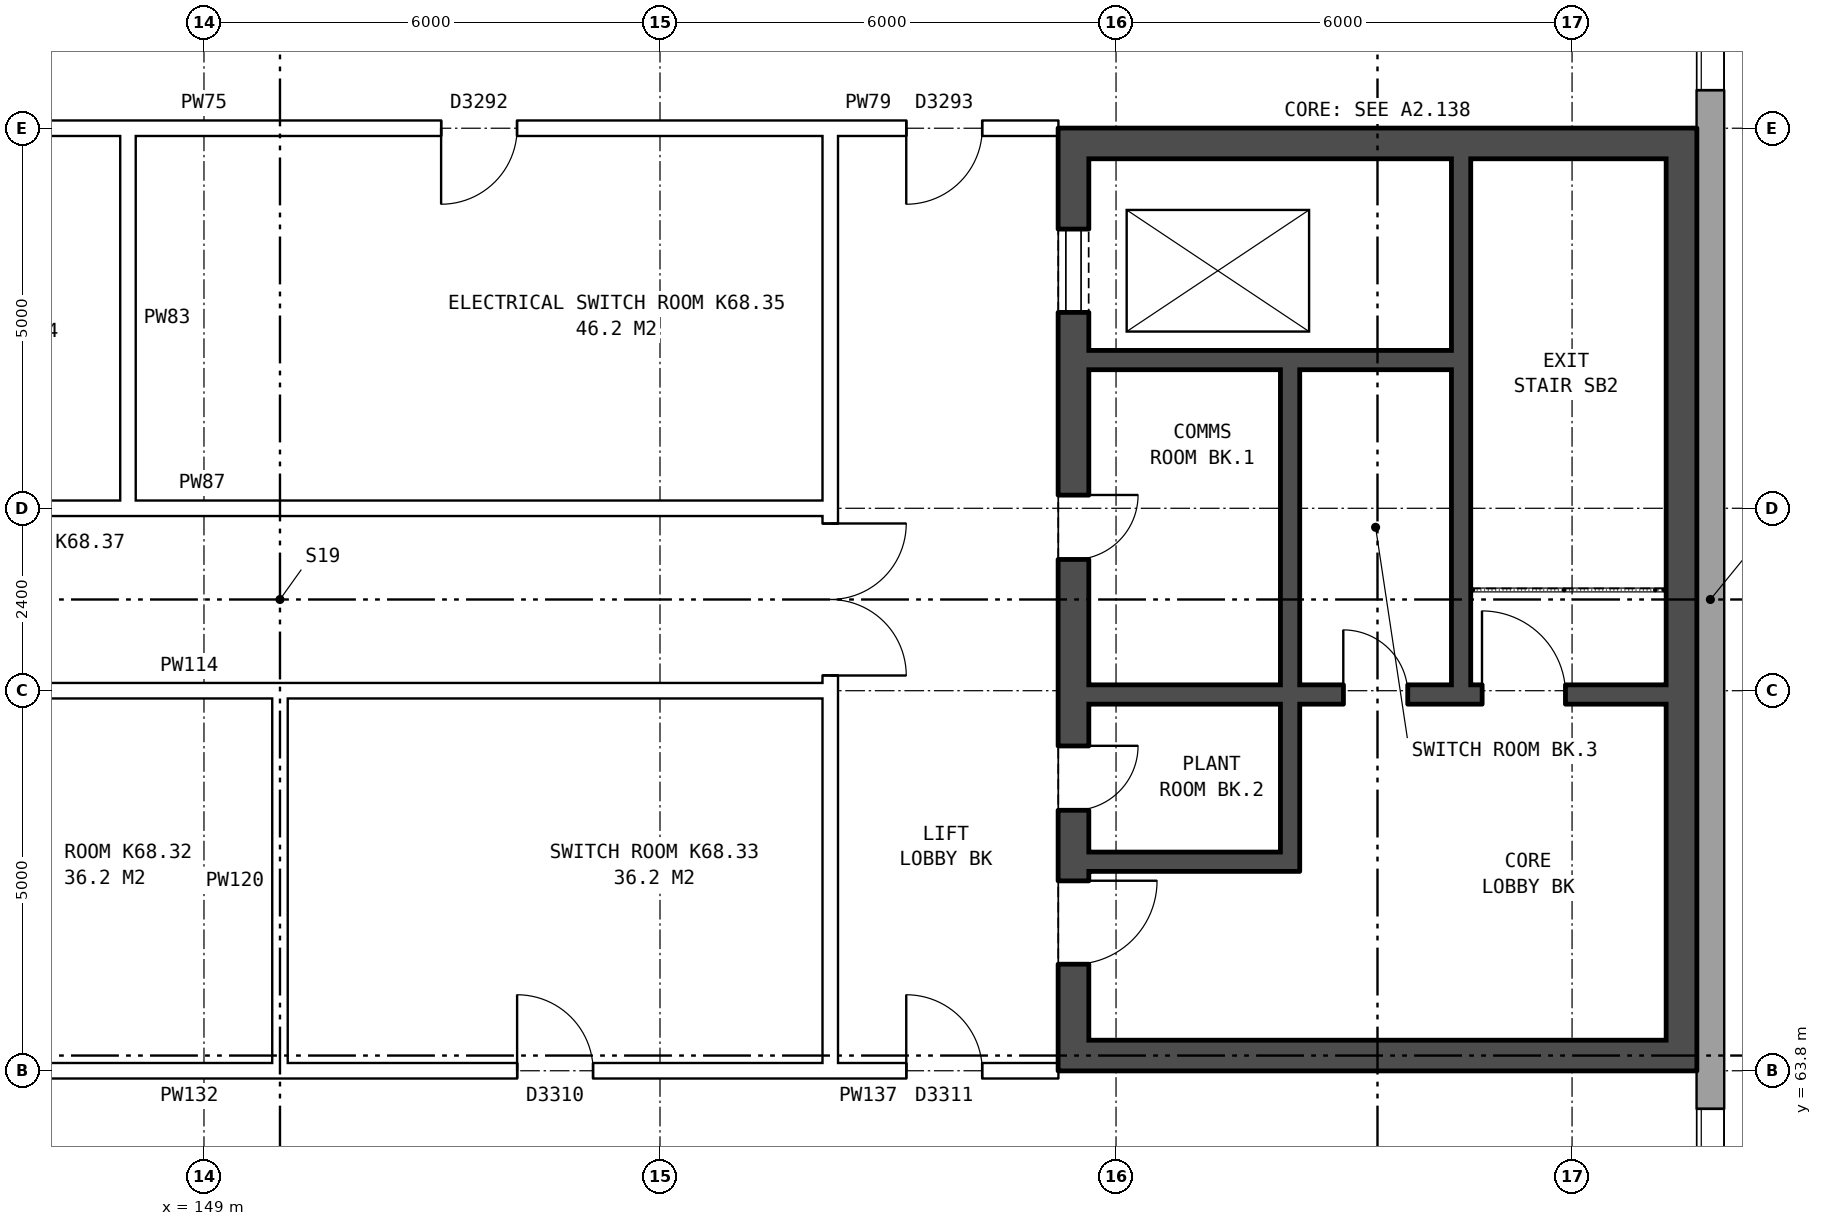
"""IFC4 building model, lengths in metres.
Left out: names, types, materials, properties, quantities, classifications, styles, units other than length and angle.
Written with IfcOpenShell. Run it as: python <this file> out.ifc"""

import sys

from ifc_helpers import new_model, si_unit, direction, frame, frame_2d, origin, place, context, subcontext, project, spatial, polyline, rectangle, outline, extrude, element, fill, save


model = new_model("IFC4")
c1 = context("Model", 3, precision=1e-05, world=origin(), true_north=direction((0.0, 1.0)))
c2 = subcontext(c1, "Body", "Model", "MODEL_VIEW")
j1 = project(units=[si_unit("LENGTHUNIT", "METRE"), si_unit("PLANEANGLEUNIT", "RADIAN")], contexts=[c1])
p1 = place(None, origin())
s1 = spatial("IfcSite", under=j1, at=p1, CompositionType="ELEMENT")
p2 = place(p1, origin())
s2 = spatial("IfcBuilding", under=s1, at=p2, CompositionType="ELEMENT")
p3 = place(p2, frame((0.0, 0.0, 243.9)))
s3 = spatial("IfcBuildingStorey", under=s2, at=p3, CompositionType="ELEMENT", Elevation=243.9)
p4 = place(p3, frame((168.82, 57.075, 0.0), z_axis=(0.0, 0.0, 1.0), x_axis=(0.0, 1.0, 0.0)))
e1 = element("IfcWall", 1, at=p4, inside=s3, PredefinedType="STANDARD", context=c2, shape_type="SweptSolid", body=[
    extrude(outline(polyline([(0.0, 0.0), (25.851, 0.0), (25.851, 17.763), (0.0, 4.837), (0.0, 0.0)])), frame((0.0, 0.18, 0.0), z_axis=(0.0, -1.0, 0.0), x_axis=(1.0, 0.0, 0.0)), (0.0, 0.0, 1.0), 0.36),
])
p5 = place(p4, frame((1.625, 0.0, 1.5)))
e2 = element("IfcOpeningElement", 2, at=p5, cuts=e1, PredefinedType="OPENING", context=c2, shape_type="SweptSolid", body=[
    extrude(rectangle(XDim=1.6, YDim=1.2, at=frame_2d((0.8, 0.6))), frame((0.0, 0.19, 0.0), z_axis=(0.0, -1.0, 0.0), x_axis=(1.0, 0.0, 0.0)), (0.0, 0.0, 1.0), 0.38),
])
p6 = place(p4, frame((4.625, 0.0, 1.5)))
e3 = element("IfcOpeningElement", 3, at=p6, cuts=e1, PredefinedType="OPENING", context=c2, shape_type="SweptSolid", body=[
    extrude(rectangle(XDim=1.6, YDim=1.2, at=frame_2d((0.8, 0.6))), frame((0.0, 0.19, 0.0), z_axis=(0.0, -1.0, 0.0), x_axis=(1.0, 0.0, 0.0)), (0.0, 0.0, 1.0), 0.38),
])
p7 = place(p4, frame((19.625, 0.0, 1.5)))
e4 = element("IfcOpeningElement", 4, at=p7, cuts=e1, PredefinedType="OPENING", context=c2, shape_type="SweptSolid", body=[
    extrude(rectangle(XDim=1.6, YDim=1.2, at=frame_2d((0.8, 0.6))), frame((0.0, 0.19, 0.0), z_axis=(0.0, -1.0, 0.0), x_axis=(1.0, 0.0, 0.0)), (0.0, 0.0, 1.0), 0.38),
])
p8 = place(p4, frame((22.625, 0.0, 1.5)))
e5 = element("IfcOpeningElement", 5, at=p8, cuts=e1, PredefinedType="OPENING", context=c2, shape_type="SweptSolid", body=[
    extrude(rectangle(XDim=1.6, YDim=1.2, at=frame_2d((0.8, 0.6))), frame((0.0, 0.19, 0.0), z_axis=(0.0, -1.0, 0.0), x_axis=(1.0, 0.0, 0.0)), (0.0, 0.0, 1.0), 0.38),
])
p9 = place(p3, frame((160.44, 76.2, 0.0), z_axis=(0.0, 0.0, 1.0), x_axis=(0.0, -1.0, 0.0)))
e6 = element("IfcWall", 6, at=p9, inside=s3, PredefinedType="SHEAR", context=c2, shape_type="SweptSolid", body=[
    extrude(rectangle(XDim=12.4, YDim=0.4, at=frame_2d((6.2, 0.0))), origin(), (0.0, 0.0, 1.0), 3.3),
])
p10 = place(p9, frame((1.325, 0.0, 0.0)))
e7 = element("IfcOpeningElement", 7, at=p10, cuts=e6, PredefinedType="OPENING", context=c2, shape_type="SweptSolid", body=[
    extrude(rectangle(XDim=1.1, YDim=2.1, at=frame_2d((0.55, 1.05))), frame((0.0, 0.21, 0.0), z_axis=(0.0, -1.0, 0.0), x_axis=(1.0, 0.0, 0.0)), (0.0, 0.0, 1.0), 0.42),
])
p11 = place(p9, frame((4.825, 0.0, 0.0)))
e8 = element("IfcOpeningElement", 8, at=p11, cuts=e6, PredefinedType="OPENING", context=c2, shape_type="SweptSolid", body=[
    extrude(rectangle(XDim=0.85, YDim=2.1, at=frame_2d((0.425, 1.05))), frame((0.0, 0.21, 0.0), z_axis=(0.0, -1.0, 0.0), x_axis=(1.0, 0.0, 0.0)), (0.0, 0.0, 1.0), 0.42),
])
p12 = place(p9, frame((9.9, 0.0, 0.0)))
e9 = element("IfcOpeningElement", 9, at=p12, cuts=e6, PredefinedType="OPENING", context=c2, shape_type="SweptSolid", body=[
    extrude(rectangle(XDim=1.1, YDim=2.1, at=frame_2d((0.55, 1.05))), frame((0.0, 0.21, 0.0), z_axis=(0.0, -1.0, 0.0), x_axis=(1.0, 0.0, 0.0)), (0.0, 0.0, 1.0), 0.42),
])
p13 = place(p9, frame((8.125, 0.0, 0.0)))
e10 = element("IfcOpeningElement", 10, at=p13, cuts=e6, PredefinedType="OPENING", context=c2, shape_type="SweptSolid", body=[
    extrude(rectangle(XDim=0.85, YDim=2.1, at=frame_2d((0.425, 1.05))), frame((0.0, 0.21, 0.0), z_axis=(0.0, -1.0, 0.0), x_axis=(1.0, 0.0, 0.0)), (0.0, 0.0, 1.0), 0.42),
])
p14 = place(p3, frame((168.44, 76.2, 0.0), z_axis=(0.0, 0.0, 1.0), x_axis=(0.0, -1.0, 0.0)))
e11 = element("IfcWall", 11, at=p14, inside=s3, PredefinedType="SHEAR", context=c2, shape_type="SweptSolid", body=[
    extrude(rectangle(XDim=12.4, YDim=0.4, at=frame_2d((6.2, 0.0))), origin(), (0.0, 0.0, 1.0), 3.3),
])
for number, where, z_axis, x_axis in (
    (12, (160.64, 76.0, 0.0), (0.0, 0.0, 1.0), (1.0, 0.0, 0.0)),
    (13, (160.64, 64.0, 0.0), (0.0, 0.0, 1.0), (1.0, 0.0, 0.0)),
):
    element("IfcWall", number, at=place(p3, frame(where, z_axis=z_axis, x_axis=x_axis)), inside=s3, PredefinedType="SHEAR", context=c2, shape_type="SweptSolid", body=[
        extrude(rectangle(XDim=7.6, YDim=0.4, at=frame_2d((3.8, 0.0))), origin(), (0.0, 0.0, 1.0), 3.3),
    ])
p15 = place(p3, frame((160.64, 73.15, 0.0), z_axis=(0.0, 0.0, 1.0), x_axis=(1.0, 0.0, 0.0)))
e14 = element("IfcWall", 14, at=p15, inside=s3, PredefinedType="SHEAR", context=c2, shape_type="SweptSolid", body=[
    extrude(rectangle(XDim=4.775, YDim=0.25, at=frame_2d((2.388, 0.0))), origin(), (0.0, 0.0, 1.0), 3.3),
])
p16 = place(p3, frame((160.64, 68.75, 0.0), z_axis=(0.0, 0.0, 1.0), x_axis=(1.0, 0.0, 0.0)))
e15 = element("IfcWall", 15, at=p16, inside=s3, PredefinedType="SHEAR", context=c2, shape_type="SweptSolid", body=[
    extrude(rectangle(XDim=7.6, YDim=0.25, at=frame_2d((3.8, 0.0))), origin(), (0.0, 0.0, 1.0), 3.3),
])
p17 = place(p16, frame((5.175, 0.0, 0.0)))
e16 = element("IfcOpeningElement", 16, at=p17, cuts=e15, PredefinedType="OPENING", context=c2, shape_type="SweptSolid", body=[
    extrude(rectangle(XDim=1.1, YDim=2.1, at=frame_2d((0.55, 1.05))), frame((0.0, 0.135, 0.0), z_axis=(0.0, -1.0, 0.0), x_axis=(1.0, 0.0, 0.0)), (0.0, 0.0, 1.0), 0.27),
])
p18 = place(p16, frame((3.35, 0.0, 0.0)))
e17 = element("IfcOpeningElement", 17, at=p18, cuts=e15, PredefinedType="OPENING", context=c2, shape_type="SweptSolid", body=[
    extrude(rectangle(XDim=0.85, YDim=2.1, at=frame_2d((0.425, 1.05))), frame((0.0, 0.135, 0.0), z_axis=(0.0, -1.0, 0.0), x_axis=(1.0, 0.0, 0.0)), (0.0, 0.0, 1.0), 0.27),
])
p19 = place(p3, frame((160.64, 66.55, 0.0), z_axis=(0.0, 0.0, 1.0), x_axis=(1.0, 0.0, 0.0)))
e18 = element("IfcWall", 18, at=p19, inside=s3, PredefinedType="SHEAR", context=c2, shape_type="SweptSolid", body=[
    extrude(rectangle(XDim=2.525, YDim=0.25, at=frame_2d((1.263, 0.0))), origin(), (0.0, 0.0, 1.0), 3.3),
])
p20 = place(p3, frame((163.29, 73.025, 0.0), z_axis=(0.0, 0.0, 1.0), x_axis=(0.0, -1.0, 0.0)))
e19 = element("IfcWall", 19, at=p20, inside=s3, PredefinedType="SHEAR", context=c2, shape_type="SweptSolid", body=[
    extrude(rectangle(XDim=4.15, YDim=0.25, at=frame_2d((2.075, 0.0))), origin(), (0.0, 0.0, 1.0), 3.3),
])
p21 = place(p3, frame((163.29, 68.625, 0.0), z_axis=(0.0, 0.0, 1.0), x_axis=(0.0, -1.0, 0.0)))
e20 = element("IfcWall", 20, at=p21, inside=s3, PredefinedType="SHEAR", context=c2, shape_type="SweptSolid", body=[
    extrude(rectangle(XDim=2.2, YDim=0.25, at=frame_2d((1.1, 0.0))), origin(), (0.0, 0.0, 1.0), 3.3),
])
p22 = place(p3, frame((165.54, 75.8, 0.0), z_axis=(0.0, 0.0, 1.0), x_axis=(0.0, -1.0, 0.0)))
e21 = element("IfcWall", 21, at=p22, inside=s3, PredefinedType="SHEAR", context=c2, shape_type="SweptSolid", body=[
    extrude(rectangle(XDim=6.925, YDim=0.25, at=frame_2d((3.462, 0.0))), origin(), (0.0, 0.0, 1.0), 3.3),
])
p23 = place(p3, frame((157.24, 63.9, 0.0), z_axis=(0.0, 0.0, 1.0), x_axis=(0.0, 1.0, 0.0)))
e22 = element("IfcWall", 22, at=p23, inside=s3, PredefinedType="PARTITIONING", context=c2, shape_type="SweptSolid", body=[
    extrude(rectangle(XDim=12.2, YDim=0.2, at=frame_2d((6.1, 0.0))), origin(), (0.0, 0.0, 1.0), 3.3),
])
p24 = place(p23, frame((5.1, 0.0, 0.0)))
e23 = element("IfcOpeningElement", 23, at=p24, cuts=e22, PredefinedType="OPENING", context=c2, shape_type="SweptSolid", body=[
    extrude(rectangle(XDim=2.0, YDim=2.1, at=frame_2d((1.0, 1.05))), frame((0.0, 0.11, 0.0), z_axis=(0.0, -1.0, 0.0), x_axis=(1.0, 0.0, 0.0)), (0.0, 0.0, 1.0), 0.22),
])
p25 = place(p3, frame((142.76, 63.8, 0.0), z_axis=(0.0, 0.0, 1.0), x_axis=(1.0, 0.0, 0.0)))
e24 = element("IfcWall", 24, at=p25, inside=s3, PredefinedType="PARTITIONING", context=c2, shape_type="SweptSolid", body=[
    extrude(rectangle(XDim=14.48, YDim=0.2, at=frame_2d((7.24, 0.0))), origin(), (0.0, 0.0, 1.0), 3.3),
])
p26 = place(p25, frame((3.12, 0.0, 0.0)))
e25 = element("IfcOpeningElement", 25, at=p26, cuts=e24, PredefinedType="OPENING", context=c2, shape_type="SweptSolid", body=[
    extrude(rectangle(XDim=1.0, YDim=2.1, at=frame_2d((0.5, 1.05))), frame((0.0, 0.11, 0.0), z_axis=(0.0, -1.0, 0.0), x_axis=(1.0, 0.0, 0.0)), (0.0, 0.0, 1.0), 0.22),
])
p27 = place(p25, frame((10.36, 0.0, 0.0)))
e26 = element("IfcOpeningElement", 26, at=p27, cuts=e24, PredefinedType="OPENING", context=c2, shape_type="SweptSolid", body=[
    extrude(rectangle(XDim=1.0, YDim=2.1, at=frame_2d((0.5, 1.05))), frame((0.0, 0.11, 0.0), z_axis=(0.0, -1.0, 0.0), x_axis=(1.0, 0.0, 0.0)), (0.0, 0.0, 1.0), 0.22),
])
p28 = place(p3, frame((157.24, 63.8, 0.0), z_axis=(0.0, 0.0, 1.0), x_axis=(1.0, 0.0, 0.0)))
e27 = element("IfcWall", 27, at=p28, inside=s3, PredefinedType="PARTITIONING", context=c2, shape_type="SweptSolid", body=[
    extrude(rectangle(XDim=3.0, YDim=0.2, at=frame_2d((1.5, 0.0))), origin(), (0.0, 0.0, 1.0), 3.3),
])
p29 = place(p28, frame((1.0, 0.0, 0.0)))
e28 = element("IfcOpeningElement", 28, at=p29, cuts=e27, PredefinedType="OPENING", context=c2, shape_type="SweptSolid", body=[
    extrude(rectangle(XDim=1.0, YDim=2.1, at=frame_2d((0.5, 1.05))), frame((0.0, 0.11, 0.0), z_axis=(0.0, -1.0, 0.0), x_axis=(1.0, 0.0, 0.0)), (0.0, 0.0, 1.0), 0.22),
])
for number, where, z_axis, x_axis in (
    (29, (142.76, 68.8, 0.0), (0.0, 0.0, 1.0), (1.0, 0.0, 0.0)),
    (30, (142.76, 71.2, 0.0), (0.0, 0.0, 1.0), (1.0, 0.0, 0.0)),
):
    element("IfcWall", number, at=place(p3, frame(where, z_axis=z_axis, x_axis=x_axis)), inside=s3, PredefinedType="PARTITIONING", context=c2, shape_type="SweptSolid", body=[
        extrude(rectangle(XDim=14.48, YDim=0.2, at=frame_2d((7.24, 0.0))), origin(), (0.0, 0.0, 1.0), 3.3),
    ])
p30 = place(p3, frame((142.76, 76.2, 0.0), z_axis=(0.0, 0.0, 1.0), x_axis=(1.0, 0.0, 0.0)))
e31 = element("IfcWall", 31, at=p30, inside=s3, PredefinedType="PARTITIONING", context=c2, shape_type="SweptSolid", body=[
    extrude(rectangle(XDim=14.48, YDim=0.2, at=frame_2d((7.24, 0.0))), origin(), (0.0, 0.0, 1.0), 3.3),
])
p31 = place(p30, frame((2.12, 0.0, 0.0)))
e32 = element("IfcOpeningElement", 32, at=p31, cuts=e31, PredefinedType="OPENING", context=c2, shape_type="SweptSolid", body=[
    extrude(rectangle(XDim=1.0, YDim=2.1, at=frame_2d((0.5, 1.05))), frame((0.0, 0.11, 0.0), z_axis=(0.0, -1.0, 0.0), x_axis=(1.0, 0.0, 0.0)), (0.0, 0.0, 1.0), 0.22),
])
p32 = place(p30, frame((9.36, 0.0, 0.0)))
e33 = element("IfcOpeningElement", 33, at=p32, cuts=e31, PredefinedType="OPENING", context=c2, shape_type="SweptSolid", body=[
    extrude(rectangle(XDim=1.0, YDim=2.1, at=frame_2d((0.5, 1.05))), frame((0.0, 0.11, 0.0), z_axis=(0.0, -1.0, 0.0), x_axis=(1.0, 0.0, 0.0)), (0.0, 0.0, 1.0), 0.22),
])
p33 = place(p3, frame((157.24, 76.2, 0.0), z_axis=(0.0, 0.0, 1.0), x_axis=(1.0, 0.0, 0.0)))
e34 = element("IfcWall", 34, at=p33, inside=s3, PredefinedType="PARTITIONING", context=c2, shape_type="SweptSolid", body=[
    extrude(rectangle(XDim=3.0, YDim=0.2, at=frame_2d((1.5, 0.0))), origin(), (0.0, 0.0, 1.0), 3.3),
])
p34 = place(p33, frame((1.0, 0.0, 0.0)))
e35 = element("IfcOpeningElement", 35, at=p34, cuts=e34, PredefinedType="OPENING", context=c2, shape_type="SweptSolid", body=[
    extrude(rectangle(XDim=1.0, YDim=2.1, at=frame_2d((0.5, 1.05))), frame((0.0, 0.11, 0.0), z_axis=(0.0, -1.0, 0.0), x_axis=(1.0, 0.0, 0.0)), (0.0, 0.0, 1.0), 0.22),
])
for number, where, z_axis, x_axis in (
    (36, (148.0, 71.1, 0.0), (0.0, 0.0, 1.0), (0.0, 1.0, 0.0)),
    (37, (150.0, 63.7, 0.0), (0.0, 0.0, 1.0), (0.0, 1.0, 0.0)),
):
    element("IfcWall", number, at=place(p3, frame(where, z_axis=z_axis, x_axis=x_axis)), inside=s3, PredefinedType="PARTITIONING", context=c2, shape_type="SweptSolid", body=[
        extrude(rectangle(XDim=5.2, YDim=0.2, at=frame_2d((2.6, 0.0))), origin(), (0.0, 0.0, 1.0), 3.3),
    ])
p35 = place(p6, origin())
e38 = element("IfcWindow", 38, at=p35, inside=s3, PartitioningType="DOUBLE_PANEL_HORIZONTAL", PredefinedType="WINDOW", context=c2, shape_type="SweptSolid", body=[
    extrude(rectangle(XDim=1.6, YDim=1.2, at=frame_2d((0.8, 0.6))), frame((0.0, 0.15, 0.0), z_axis=(0.0, -1.0, 0.0), x_axis=(1.0, 0.0, 0.0)), (0.0, 0.0, 1.0), 0.06),
])
fill(e3, e38)
p36 = place(p7, origin())
e39 = element("IfcWindow", 39, at=p36, inside=s3, PartitioningType="DOUBLE_PANEL_HORIZONTAL", PredefinedType="WINDOW", context=c2, shape_type="SweptSolid", body=[
    extrude(rectangle(XDim=1.6, YDim=1.2, at=frame_2d((0.8, 0.6))), frame((0.0, 0.15, 0.0), z_axis=(0.0, -1.0, 0.0), x_axis=(1.0, 0.0, 0.0)), (0.0, 0.0, 1.0), 0.06),
])
fill(e4, e39)
p37 = place(p10, origin())
e40 = element("IfcDoor", 40, at=p37, inside=s3, OperationType="DOUBLE_DOOR_SLIDING", PredefinedType="DOOR", context=c2, shape_type="SweptSolid", body=[
    extrude(rectangle(XDim=1.1, YDim=2.1, at=frame_2d((0.55, 1.05))), frame((0.0, 0.185, 0.0), z_axis=(0.0, -1.0, 0.0), x_axis=(1.0, 0.0, 0.0)), (0.0, 0.0, 1.0), 0.05),
])
fill(e7, e40)
p38 = place(p11, origin())
e41 = element("IfcDoor", 41, at=p38, inside=s3, OperationType="SINGLE_SWING_LEFT", PredefinedType="DOOR", context=c2, shape_type="SweptSolid", body=[
    extrude(rectangle(XDim=0.85, YDim=2.1, at=frame_2d((0.425, 1.05))), frame((0.0, 0.185, 0.0), z_axis=(0.0, -1.0, 0.0), x_axis=(1.0, 0.0, 0.0)), (0.0, 0.0, 1.0), 0.05),
])
fill(e8, e41)
p39 = place(p12, origin())
e42 = element("IfcDoor", 42, at=p39, inside=s3, OperationType="SINGLE_SWING_LEFT", PredefinedType="DOOR", context=c2, shape_type="SweptSolid", body=[
    extrude(rectangle(XDim=1.1, YDim=2.1, at=frame_2d((0.55, 1.05))), frame((0.0, 0.185, 0.0), z_axis=(0.0, -1.0, 0.0), x_axis=(1.0, 0.0, 0.0)), (0.0, 0.0, 1.0), 0.05),
])
fill(e9, e42)
p40 = place(p17, origin())
e43 = element("IfcDoor", 43, at=p40, inside=s3, OperationType="SINGLE_SWING_LEFT", PredefinedType="DOOR", context=c2, shape_type="SweptSolid", body=[
    extrude(rectangle(XDim=1.1, YDim=2.1, at=frame_2d((0.55, 1.05))), frame((0.0, 0.025, 0.0), z_axis=(0.0, -1.0, 0.0), x_axis=(1.0, 0.0, 0.0)), (0.0, 0.0, 1.0), 0.05),
])
fill(e16, e43)
p41 = place(p13, origin())
e44 = element("IfcDoor", 44, at=p41, inside=s3, OperationType="SINGLE_SWING_LEFT", PredefinedType="DOOR", context=c2, shape_type="SweptSolid", body=[
    extrude(rectangle(XDim=0.85, YDim=2.1, at=frame_2d((0.425, 1.05))), frame((0.0, 0.185, 0.0), z_axis=(0.0, -1.0, 0.0), x_axis=(1.0, 0.0, 0.0)), (0.0, 0.0, 1.0), 0.05),
])
fill(e10, e44)
p42 = place(p18, origin())
e45 = element("IfcDoor", 45, at=p42, inside=s3, OperationType="SINGLE_SWING_LEFT", PredefinedType="DOOR", context=c2, shape_type="SweptSolid", body=[
    extrude(rectangle(XDim=0.85, YDim=2.1, at=frame_2d((0.425, 1.05))), frame((0.0, 0.025, 0.0), z_axis=(0.0, -1.0, 0.0), x_axis=(1.0, 0.0, 0.0)), (0.0, 0.0, 1.0), 0.05),
])
fill(e17, e45)
p43 = place(p24, frame((2.0, 0.0, 0.0), z_axis=(0.0, 0.0, 1.0), x_axis=(-1.0, 0.0, 0.0)))
e46 = element("IfcDoor", 46, at=p43, inside=s3, OperationType="DOUBLE_DOOR_SINGLE_SWING", PredefinedType="DOOR", context=c2, shape_type="SweptSolid", body=[
    extrude(rectangle(XDim=2.0, YDim=2.1, at=frame_2d((1.0, 1.05))), frame((0.0, 0.025, 0.0), z_axis=(0.0, -1.0, 0.0), x_axis=(1.0, 0.0, 0.0)), (0.0, 0.0, 1.0), 0.05),
])
fill(e23, e46)
p44 = place(p27, origin())
e47 = element("IfcDoor", 47, at=p44, inside=s3, OperationType="SINGLE_SWING_LEFT", PredefinedType="DOOR", context=c2, shape_type="SweptSolid", body=[
    extrude(rectangle(XDim=1.0, YDim=2.1, at=frame_2d((0.5, 1.05))), frame((0.0, 0.025, 0.0), z_axis=(0.0, -1.0, 0.0), x_axis=(1.0, 0.0, 0.0)), (0.0, 0.0, 1.0), 0.05),
])
fill(e26, e47)
p45 = place(p29, origin())
e48 = element("IfcDoor", 48, at=p45, inside=s3, OperationType="SINGLE_SWING_LEFT", PredefinedType="DOOR", context=c2, shape_type="SweptSolid", body=[
    extrude(rectangle(XDim=1.0, YDim=2.1, at=frame_2d((0.5, 1.05))), frame((0.0, 0.025, 0.0), z_axis=(0.0, -1.0, 0.0), x_axis=(1.0, 0.0, 0.0)), (0.0, 0.0, 1.0), 0.05),
])
fill(e28, e48)
p46 = place(p32, frame((1.0, 0.0, 0.0), z_axis=(0.0, 0.0, 1.0), x_axis=(-1.0, 0.0, 0.0)))
e49 = element("IfcDoor", 49, at=p46, inside=s3, OperationType="SINGLE_SWING_RIGHT", PredefinedType="DOOR", context=c2, shape_type="SweptSolid", body=[
    extrude(rectangle(XDim=1.0, YDim=2.1, at=frame_2d((0.5, 1.05))), frame((0.0, 0.025, 0.0), z_axis=(0.0, -1.0, 0.0), x_axis=(1.0, 0.0, 0.0)), (0.0, 0.0, 1.0), 0.05),
])
fill(e33, e49)
p47 = place(p34, frame((1.0, 0.0, 0.0), z_axis=(0.0, 0.0, 1.0), x_axis=(-1.0, 0.0, 0.0)))
e50 = element("IfcDoor", 50, at=p47, inside=s3, OperationType="SINGLE_SWING_RIGHT", PredefinedType="DOOR", context=c2, shape_type="SweptSolid", body=[
    extrude(rectangle(XDim=1.0, YDim=2.1, at=frame_2d((0.5, 1.05))), frame((0.0, 0.025, 0.0), z_axis=(0.0, -1.0, 0.0), x_axis=(1.0, 0.0, 0.0)), (0.0, 0.0, 1.0), 0.05),
])
fill(e35, e50)
save(model, sys.argv[1])
